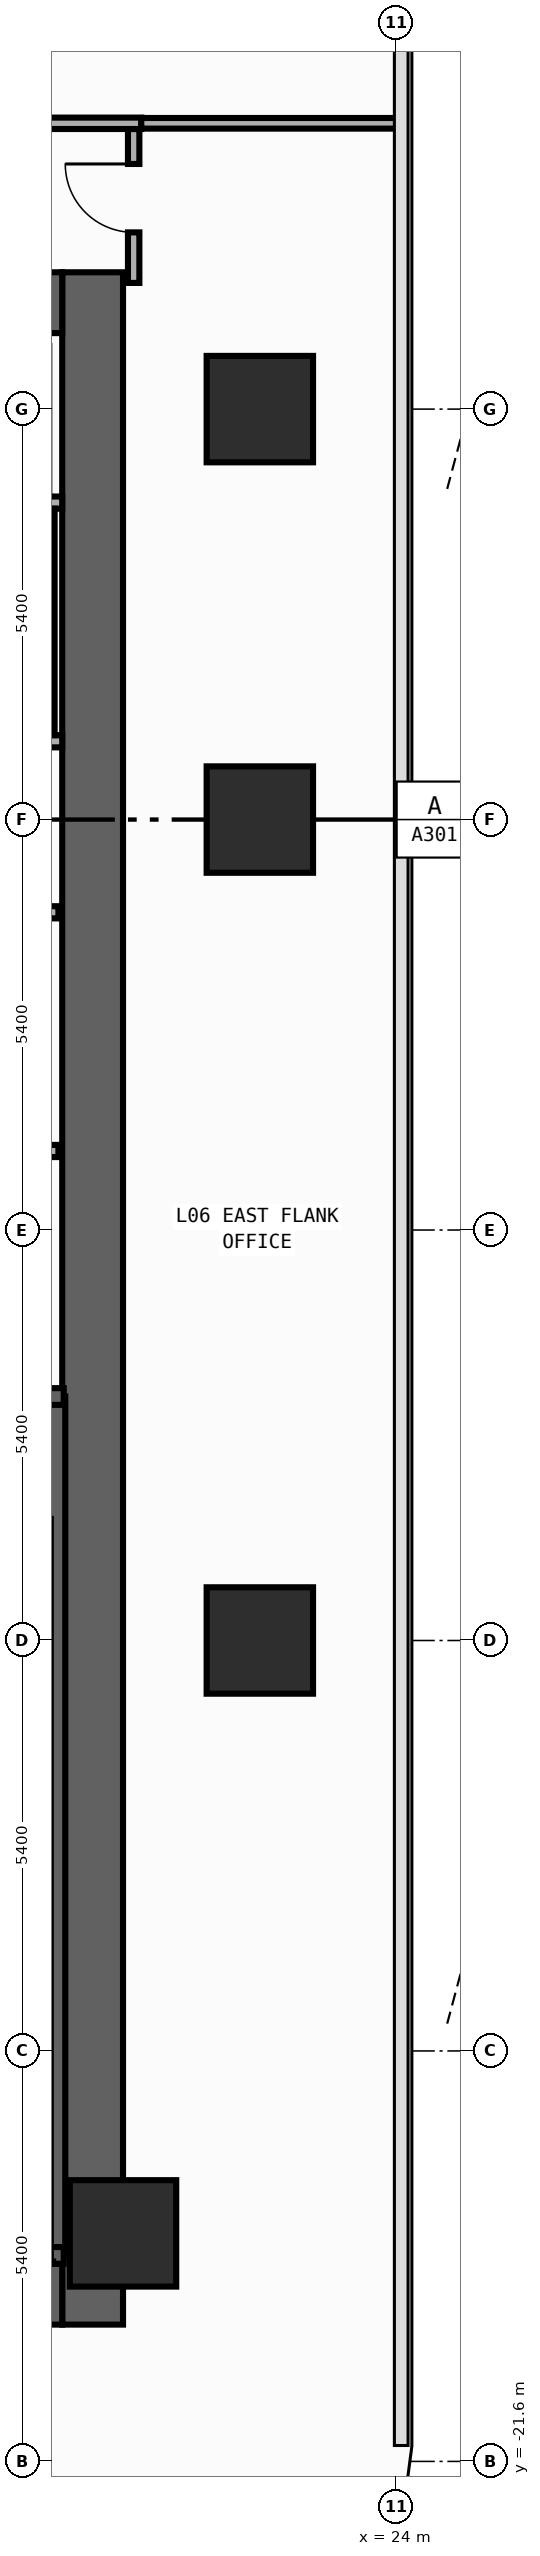
"""IFC4 building model, lengths in metres.
Left out: names, types, materials, properties, quantities, classifications, styles, units other than length and angle.
Written with IfcOpenShell. Run it as: python <this file> out.ifc"""

import sys

from ifc_helpers import new_model, si_unit, direction, frame, frame_2d, origin, origin_2d, place, context, subcontext, project, spatial, rectangle, extrude, element, fill, save


model = new_model("IFC4")
c1 = context("Model", 3, precision=1e-05, world=origin(), true_north=direction((0.0, 1.0)))
c2 = subcontext(c1, "Body", "Model", "MODEL_VIEW")
j1 = project(units=[si_unit("LENGTHUNIT", "METRE"), si_unit("PLANEANGLEUNIT", "RADIAN")], contexts=[c1])
p1 = place(None, origin())
s1 = spatial("IfcSite", under=j1, at=p1, CompositionType="ELEMENT")
p2 = place(p1, origin())
s2 = spatial("IfcBuilding", under=s1, at=p2, CompositionType="ELEMENT")
p3 = place(p2, frame((0.0, 0.0, 26.0)))
s3 = spatial("IfcBuildingStorey", under=s2, at=p3, CompositionType="ELEMENT", Elevation=26.0)
p4 = place(p3, frame((20.0, -19.8, 0.0), z_axis=(0.0, 0.0, 1.0), x_axis=(0.0, 1.0, 0.0)))
e1 = element("IfcWall", 1, at=p4, inside=s3, PredefinedType="SHEAR", context=c2, shape_type="SweptSolid", body=[
    extrude(rectangle(XDim=27.0, YDim=0.8, at=frame_2d((13.5, 0.0))), origin(), (0.0, 0.0, 1.0), 3.94),
])
for number, where, z_axis, x_axis in (
    (2, (12.8, -19.4, 0.0), (0.0, 0.0, 1.0), (1.0, 0.0, 0.0)),
    (3, (12.8, 6.8, 0.0), (0.0, 0.0, 1.0), (1.0, 0.0, 0.0)),
):
    element("IfcWall", number, at=place(p3, frame(where, z_axis=z_axis, x_axis=x_axis)), inside=s3, PredefinedType="SHEAR", context=c2, shape_type="SweptSolid", body=[
        extrude(rectangle(XDim=6.8, YDim=0.8, at=frame_2d((3.4, 0.0))), origin(), (0.0, 0.0, 1.0), 3.94),
    ])
p5 = place(p3, frame((19.53, -18.89, 0.0), z_axis=(0.0, 0.0, 1.0), x_axis=(0.0, 1.0, 0.0)))
e4 = element("IfcWall", 4, at=p5, inside=s3, PredefinedType="SHEAR", context=c2, shape_type="SweptSolid", body=[
    extrude(rectangle(XDim=11.3, YDim=0.22, at=frame_2d((5.65, 0.0))), origin(), (0.0, 0.0, 1.0), 3.94),
])
p6 = place(p3, frame((15.705, -18.89, 0.0), z_axis=(0.0, 0.0, 1.0), x_axis=(1.0, 0.0, 0.0)))
e5 = element("IfcWall", 5, at=p6, inside=s3, PredefinedType="SHEAR", context=c2, shape_type="SweptSolid", body=[
    extrude(rectangle(XDim=3.915, YDim=0.22, at=frame_2d((1.958, 0.0))), origin(), (0.0, 0.0, 1.0), 3.94),
])
p7 = place(p3, frame((19.62, -7.59, 0.0), z_axis=(0.0, 0.0, 1.0), x_axis=(-1.0, 0.0, 0.0)))
e6 = element("IfcWall", 6, at=p7, inside=s3, PredefinedType="SHEAR", context=c2, shape_type="SweptSolid", body=[
    extrude(rectangle(XDim=3.915, YDim=0.22, at=frame_2d((1.958, 0.0))), origin(), (0.0, 0.0, 1.0), 3.94),
])
p8 = place(p7, frame((1.08, 0.0, 0.0)))
e7 = element("IfcOpeningElement", 7, at=p8, cuts=e6, PredefinedType="OPENING", context=c2, shape_type="SweptSolid", body=[
    extrude(rectangle(XDim=1.1, YDim=2.2, at=frame_2d((0.55, 1.1))), frame((0.0, 0.12, 0.0), z_axis=(0.0, -1.0, 0.0), x_axis=(1.0, 0.0, 0.0)), (0.0, 0.0, 1.0), 0.24),
])
for number, where, z_axis, x_axis in (
    (8, (20.4, -18.6, 0.0), (0.0, 0.0, 1.0), (1.0, 0.0, 0.0)),
    (9, (22.2, -10.8, 0.0), (0.0, 0.0, 1.0), (1.0, 0.0, 0.0)),
    (10, (22.2, 0.0, 0.0), (0.0, 0.0, 1.0), (1.0, 0.0, 0.0)),
    (11, (22.2, 5.4, 0.0), (0.0, 0.0, 1.0), (1.0, 0.0, 0.0)),
):
    element("IfcColumn", number, at=place(p3, frame(where, z_axis=z_axis, x_axis=x_axis)), inside=s3, PredefinedType="COLUMN", context=c2, shape_type="SweptSolid", body=[
        extrude(rectangle(XDim=1.4, YDim=1.4, at=origin_2d()), origin(), (0.0, 0.0, 1.0), 4.2),
    ])
p9 = place(p3, frame((15.75, -4.36, 0.0), z_axis=(0.0, 0.0, 1.0), x_axis=(1.0, 0.0, 0.0)))
e12 = element("IfcWall", 12, at=p9, inside=s3, PredefinedType="STANDARD", context=c2, shape_type="SweptSolid", body=[
    extrude(rectangle(XDim=3.8, YDim=0.16, at=frame_2d((1.9, 0.0))), origin(), (0.0, 0.0, 1.0), 3.94),
])
p10 = place(p9, frame((1.47, 0.0, 0.0)))
e13 = element("IfcOpeningElement", 13, at=p10, cuts=e12, PredefinedType="OPENING", context=c2, shape_type="SweptSolid", body=[
    extrude(rectangle(XDim=1.15, YDim=2.2, at=frame_2d((0.575, 1.1))), frame((0.0, 0.09, 0.0), z_axis=(0.0, -1.0, 0.0), x_axis=(1.0, 0.0, 0.0)), (0.0, 0.0, 1.0), 0.18),
])
p11 = place(p3, frame((15.75, -1.22, 0.0), z_axis=(0.0, 0.0, 1.0), x_axis=(1.0, 0.0, 0.0)))
e14 = element("IfcWall", 14, at=p11, inside=s3, PredefinedType="STANDARD", context=c2, shape_type="SweptSolid", body=[
    extrude(rectangle(XDim=3.8, YDim=0.16, at=frame_2d((1.9, 0.0))), origin(), (0.0, 0.0, 1.0), 3.94),
])
for number, where, z_axis, x_axis in (
    (15, (17.31, 4.17, 0.0), (0.0, 0.0, 1.0), (1.0, 0.0, 0.0)),
    (16, (17.31, 1.03, 0.0), (0.0, 0.0, 1.0), (1.0, 0.0, 0.0)),
):
    element("IfcWall", number, at=place(p3, frame(where, z_axis=z_axis, x_axis=x_axis)), inside=s3, PredefinedType="PARTITIONING", context=c2, shape_type="SweptSolid", body=[
        extrude(rectangle(XDim=2.29, YDim=0.16, at=frame_2d((1.145, 0.0))), origin(), (0.0, 0.0, 1.0), 3.94),
    ])
p12 = place(p3, frame((20.54, 7.06, 0.0), z_axis=(0.0, 0.0, 1.0), x_axis=(0.0, 1.0, 0.0)))
e17 = element("IfcWall", 17, at=p12, inside=s3, PredefinedType="PARTITIONING", context=c2, shape_type="SweptSolid", body=[
    extrude(rectangle(XDim=2.025, YDim=0.15, at=frame_2d((1.012, 0.0))), origin(), (0.0, 0.0, 1.0), 3.94),
])
p13 = place(p12, frame((0.665, 0.0, 0.0)))
e18 = element("IfcOpeningElement", 18, at=p13, cuts=e17, PredefinedType="OPENING", context=c2, shape_type="SweptSolid", body=[
    extrude(rectangle(XDim=0.9, YDim=2.15, at=frame_2d((0.45, 1.075))), frame((0.0, 0.085, 0.0), z_axis=(0.0, -1.0, 0.0), x_axis=(1.0, 0.0, 0.0)), (0.0, 0.0, 1.0), 0.17),
])
p14 = place(p3, frame((11.81, 9.16, 0.0), z_axis=(0.0, 0.0, 1.0), x_axis=(1.0, 0.0, 0.0)))
e19 = element("IfcWall", 19, at=p14, inside=s3, PredefinedType="PARTITIONING", context=c2, shape_type="SweptSolid", body=[
    extrude(rectangle(XDim=8.83, YDim=0.15, at=frame_2d((4.415, 0.0))), origin(), (0.0, 0.0, 1.0), 3.94),
])
p15 = place(p14, frame((5.067, 0.0, 0.0)))
e20 = element("IfcOpeningElement", 20, at=p15, cuts=e19, PredefinedType="OPENING", context=c2, shape_type="SweptSolid", body=[
    extrude(rectangle(XDim=0.9, YDim=2.15, at=frame_2d((0.45, 1.075))), frame((0.0, 0.085, 0.0), z_axis=(0.0, -1.0, 0.0), x_axis=(1.0, 0.0, 0.0)), (0.0, 0.0, 1.0), 0.17),
])
p16 = place(p3, frame((20.64, 9.16, 0.0), z_axis=(0.0, 0.0, 1.0), x_axis=(1.0, 0.0, 0.0)))
e21 = element("IfcWall", 21, at=p16, inside=s3, PredefinedType="PARTITIONING", context=c2, shape_type="SweptSolid", body=[
    extrude(rectangle(XDim=3.415, YDim=0.14, at=frame_2d((1.708, 0.0))), origin(), (0.0, 0.0, 1.0), 3.94),
])
p17 = place(p3, frame((19.45, 4.09, 0.0), z_axis=(0.0, 0.0, 1.0), x_axis=(0.0, -1.0, 0.0)))
e22 = element("IfcWall", 22, at=p17, inside=s3, PredefinedType="PARTITIONING", context=c2, shape_type="SweptSolid", body=[
    extrude(rectangle(XDim=2.98, YDim=0.1, at=frame_2d((1.49, 0.0))), origin(), (0.0, 0.0, 1.0), 3.94),
])
p18 = place(p13, origin())
e23 = element("IfcDoor", 23, at=p18, inside=s3, OperationType="SINGLE_SWING_RIGHT", PredefinedType="DOOR", context=c2, shape_type="SweptSolid", body=[
    extrude(rectangle(XDim=0.9, YDim=2.15, at=frame_2d((0.45, 1.075))), frame((0.0, 0.025, 0.0), z_axis=(0.0, -1.0, 0.0), x_axis=(1.0, 0.0, 0.0)), (0.0, 0.0, 1.0), 0.05),
])
fill(e18, e23)
save(model, sys.argv[1])
